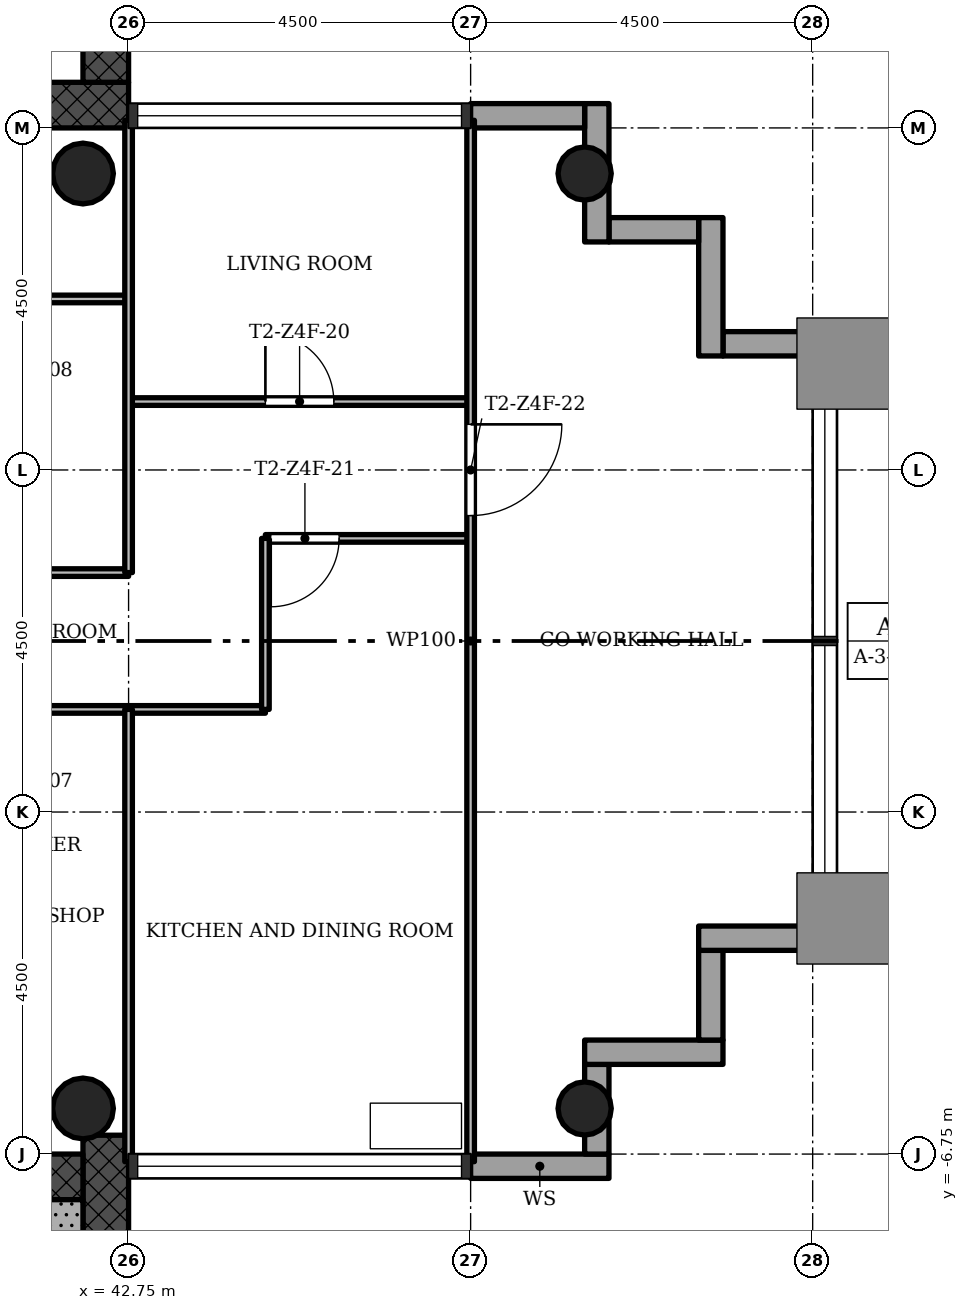
"""IFC4 building model, lengths in metres.
Left out: names, types, materials, properties, quantities, classifications, styles, units other than length and angle.
Written with IfcOpenShell. Run it as: python <this file> out.ifc"""

import sys

from ifc_helpers import new_model, si_unit, direction, frame, frame_2d, origin, origin_2d, place, context, subcontext, project, spatial, rectangle, hollow_circle, extrude, element, fill, save


model = new_model("IFC4")
c1 = context("Model", 3, precision=1e-05, world=origin(), true_north=direction((0.0, 1.0)))
c2 = subcontext(c1, "Body", "Model", "MODEL_VIEW")
j1 = project(units=[si_unit("LENGTHUNIT", "METRE"), si_unit("PLANEANGLEUNIT", "RADIAN")], contexts=[c1])
p1 = place(None, origin())
s1 = spatial("IfcSite", under=j1, at=p1, CompositionType="ELEMENT")
p2 = place(p1, origin())
s2 = spatial("IfcBuilding", under=s1, at=p2, CompositionType="ELEMENT")
p3 = place(p2, frame((0.0, 0.0, 216.4)))
s3 = spatial("IfcBuildingStorey", under=s2, at=p3, CompositionType="ELEMENT", Elevation=216.4)
p4 = place(p3, frame((29.85, 7.05, 0.0), z_axis=(0.0, 0.0, 1.0), x_axis=(1.0, 0.0, 0.0)))
e1 = element("IfcWall", 1, at=p4, inside=s3, PredefinedType="SHEAR", context=c2, shape_type="SweptSolid", body=[
    extrude(rectangle(XDim=12.9, YDim=0.6, at=frame_2d((6.45, 0.0))), origin(), (0.0, 0.0, 1.0), 3.4),
])
p5 = place(p4, frame((5.25, 0.0, 0.0)))
e2 = element("IfcOpeningElement", 2, at=p5, cuts=e1, PredefinedType="OPENING", context=c2, shape_type="SweptSolid", body=[
    extrude(rectangle(XDim=1.8, YDim=2.1, at=frame_2d((0.9, 1.05))), frame((0.0, 0.31, 0.0), z_axis=(0.0, -1.0, 0.0), x_axis=(1.0, 0.0, 0.0)), (0.0, 0.0, 1.0), 0.62),
])
p6 = place(p3, frame((42.45, 7.35, 0.0), z_axis=(0.0, 0.0, 1.0), x_axis=(0.0, 1.0, 0.0)))
e3 = element("IfcWall", 3, at=p6, inside=s3, PredefinedType="SHEAR", context=c2, shape_type="SweptSolid", body=[
    extrude(rectangle(XDim=8.4, YDim=0.6, at=frame_2d((4.2, 0.0))), origin(), (0.0, 0.0, 1.0), 3.4),
])
p7 = place(p3, frame((42.45, -15.15, 0.0), z_axis=(0.0, 0.0, 1.0), x_axis=(0.0, 1.0, 0.0)))
e4 = element("IfcWall", 4, at=p7, inside=s3, PredefinedType="SHEAR", context=c2, shape_type="SweptSolid", body=[
    extrude(rectangle(XDim=8.648, YDim=0.6, at=frame_2d((4.324, 0.0))), origin(), (0.0, 0.0, 1.0), 3.4),
])
p8 = place(p3, frame((42.15, -7.05, 0.0), z_axis=(0.0, 0.0, 1.0), x_axis=(-1.0, 0.0, 0.0)))
e5 = element("IfcWall", 5, at=p8, inside=s3, PredefinedType="SHEAR", context=c2, shape_type="SweptSolid", body=[
    extrude(rectangle(XDim=12.9, YDim=0.6, at=frame_2d((6.45, 0.0))), origin(), (0.0, 0.0, 1.0), 3.4),
])
p9 = place(p8, frame((5.25, 0.0, 0.0)))
e6 = element("IfcOpeningElement", 6, at=p9, cuts=e5, PredefinedType="OPENING", context=c2, shape_type="SweptSolid", body=[
    extrude(rectangle(XDim=1.8, YDim=2.1, at=frame_2d((0.9, 1.05))), frame((0.0, 0.31, 0.0), z_axis=(0.0, -1.0, 0.0), x_axis=(1.0, 0.0, 0.0)), (0.0, 0.0, 1.0), 0.62),
])
for number, where, z_axis, x_axis in (
    (7, (48.75, -6.15, 0.0), (0.0, 0.0, 1.0), (1.0, 0.0, 0.0)),
    (8, (48.75, 6.15, 0.0), (0.0, 0.0, 1.0), (1.0, 0.0, 0.0)),
):
    element("IfcColumn", number, at=place(p3, frame(where, z_axis=z_axis, x_axis=x_axis)), inside=s3, PredefinedType="COLUMN", context=c2, shape_type="SweptSolid", body=[
        extrude(hollow_circle(Radius=0.35, WallThickness=0.025, at=origin_2d()), origin(), (0.0, 0.0, 1.0), 3.4),
    ])
for number, where, z_axis, x_axis in (
    (9, (42.15, -6.15, 0.0), (0.0, 0.0, 1.0), (1.0, 0.0, 0.0)),
    (10, (42.15, 6.15, 0.0), (0.0, 0.0, 1.0), (1.0, 0.0, 0.0)),
):
    element("IfcColumn", number, at=place(p3, frame(where, z_axis=z_axis, x_axis=x_axis)), inside=s3, PredefinedType="COLUMN", context=c2, shape_type="SweptSolid", body=[
        extrude(hollow_circle(Radius=0.4, WallThickness=0.028, at=origin_2d()), origin(), (0.0, 0.0, 1.0), 3.4),
    ])
p10 = place(p3, frame((47.25, -6.91, -0.3), z_axis=(0.0, 0.0, 1.0), x_axis=(1.0, 0.0, 0.0)))
e11 = element("IfcWall", 11, at=p10, inside=s3, PredefinedType="STANDARD", context=c2, shape_type="SweptSolid", body=[
    extrude(rectangle(XDim=1.82, YDim=0.32, at=frame_2d((0.91, 0.0))), origin(), (0.0, 0.0, 1.0), 3.4),
])
p11 = place(p3, frame((48.91, -6.75, -0.3), z_axis=(0.0, 0.0, 1.0), x_axis=(0.0, 1.0, 0.0)))
e12 = element("IfcWall", 12, at=p11, inside=s3, PredefinedType="STANDARD", context=c2, shape_type="SweptSolid", body=[
    extrude(rectangle(XDim=1.18, YDim=0.32, at=frame_2d((0.59, 0.0))), origin(), (0.0, 0.0, 1.0), 3.4),
])
p12 = place(p3, frame((48.75, -5.41, -0.3), z_axis=(0.0, 0.0, 1.0), x_axis=(1.0, 0.0, 0.0)))
e13 = element("IfcWall", 13, at=p12, inside=s3, PredefinedType="STANDARD", context=c2, shape_type="SweptSolid", body=[
    extrude(rectangle(XDim=1.82, YDim=0.32, at=frame_2d((0.91, 0.0))), origin(), (0.0, 0.0, 1.0), 3.4),
])
p13 = place(p3, frame((50.41, -5.25, -0.3), z_axis=(0.0, 0.0, 1.0), x_axis=(0.0, 1.0, 0.0)))
e14 = element("IfcWall", 14, at=p13, inside=s3, PredefinedType="STANDARD", context=c2, shape_type="SweptSolid", body=[
    extrude(rectangle(XDim=1.18, YDim=0.32, at=frame_2d((0.59, 0.0))), origin(), (0.0, 0.0, 1.0), 3.4),
])
p14 = place(p3, frame((50.25, -3.91, -0.3), z_axis=(0.0, 0.0, 1.0), x_axis=(1.0, 0.0, 0.0)))
e15 = element("IfcWall", 15, at=p14, inside=s3, PredefinedType="STANDARD", context=c2, shape_type="SweptSolid", body=[
    extrude(rectangle(XDim=1.82, YDim=0.32, at=frame_2d((0.91, 0.0))), origin(), (0.0, 0.0, 1.0), 3.4),
])
p15 = place(p3, frame((52.07, 3.91, -0.3), z_axis=(0.0, 0.0, 1.0), x_axis=(-1.0, 0.0, 0.0)))
e16 = element("IfcWall", 16, at=p15, inside=s3, PredefinedType="STANDARD", context=c2, shape_type="SweptSolid", body=[
    extrude(rectangle(XDim=1.5, YDim=0.32, at=frame_2d((0.75, 0.0))), origin(), (0.0, 0.0, 1.0), 3.4),
])
p16 = place(p3, frame((50.41, 3.75, -0.3), z_axis=(0.0, 0.0, 1.0), x_axis=(0.0, 1.0, 0.0)))
e17 = element("IfcWall", 17, at=p16, inside=s3, PredefinedType="STANDARD", context=c2, shape_type="SweptSolid", body=[
    extrude(rectangle(XDim=1.82, YDim=0.32, at=frame_2d((0.91, 0.0))), origin(), (0.0, 0.0, 1.0), 3.4),
])
p17 = place(p3, frame((50.25, 5.41, -0.3), z_axis=(0.0, 0.0, 1.0), x_axis=(-1.0, 0.0, 0.0)))
e18 = element("IfcWall", 18, at=p17, inside=s3, PredefinedType="STANDARD", context=c2, shape_type="SweptSolid", body=[
    extrude(rectangle(XDim=1.18, YDim=0.32, at=frame_2d((0.59, 0.0))), origin(), (0.0, 0.0, 1.0), 3.4),
])
p18 = place(p3, frame((48.91, 5.25, -0.3), z_axis=(0.0, 0.0, 1.0), x_axis=(0.0, 1.0, 0.0)))
e19 = element("IfcWall", 19, at=p18, inside=s3, PredefinedType="STANDARD", context=c2, shape_type="SweptSolid", body=[
    extrude(rectangle(XDim=1.82, YDim=0.32, at=frame_2d((0.91, 0.0))), origin(), (0.0, 0.0, 1.0), 3.4),
])
p19 = place(p3, frame((48.75, 6.91, -0.3), z_axis=(0.0, 0.0, 1.0), x_axis=(-1.0, 0.0, 0.0)))
e20 = element("IfcWall", 20, at=p19, inside=s3, PredefinedType="STANDARD", context=c2, shape_type="SweptSolid", body=[
    extrude(rectangle(XDim=1.5, YDim=0.32, at=frame_2d((0.75, 0.0))), origin(), (0.0, 0.0, 1.0), 3.4),
])
p20 = place(p3, frame((44.55, -0.9, 0.0), z_axis=(0.0, 0.0, 1.0), x_axis=(-1.0, 0.0, 0.0)))
e21 = element("IfcWall", 21, at=p20, inside=s3, PredefinedType="PARTITIONING", context=c2, shape_type="SweptSolid", body=[
    extrude(rectangle(XDim=4.05, YDim=0.1, at=frame_2d((2.025, 0.0))), origin(), (0.0, 0.0, 1.0), 3.0),
])
p21 = place(p3, frame((42.75, 0.9, 0.0), z_axis=(0.0, 0.0, 1.0), x_axis=(-1.0, 0.0, 0.0)))
e22 = element("IfcWall", 22, at=p21, inside=s3, PredefinedType="PARTITIONING", context=c2, shape_type="SweptSolid", body=[
    extrude(rectangle(XDim=2.25, YDim=0.1, at=frame_2d((1.125, 0.0))), origin(), (0.0, 0.0, 1.0), 3.0),
])
p22 = place(p3, frame((47.25, 1.35, 0.0), z_axis=(0.0, 0.0, 1.0), x_axis=(-1.0, 0.0, 0.0)))
e23 = element("IfcWall", 23, at=p22, inside=s3, PredefinedType="PARTITIONING", context=c2, shape_type="SweptSolid", body=[
    extrude(rectangle(XDim=2.7, YDim=0.1, at=frame_2d((1.35, 0.0))), origin(), (0.0, 0.0, 1.0), 3.0),
])
p23 = place(p22, frame((1.73, 0.0, 0.0)))
e24 = element("IfcOpeningElement", 24, at=p23, cuts=e23, PredefinedType="OPENING", context=c2, shape_type="SweptSolid", body=[
    extrude(rectangle(XDim=0.9, YDim=2.1, at=frame_2d((0.45, 1.05))), frame((0.0, 0.06, 0.0), z_axis=(0.0, -1.0, 0.0), x_axis=(1.0, 0.0, 0.0)), (0.0, 0.0, 1.0), 0.12),
])
p24 = place(p3, frame((47.25, 3.15, 0.0), z_axis=(0.0, 0.0, 1.0), x_axis=(-1.0, 0.0, 0.0)))
e25 = element("IfcWall", 25, at=p24, inside=s3, PredefinedType="PARTITIONING", context=c2, shape_type="SweptSolid", body=[
    extrude(rectangle(XDim=4.5, YDim=0.1, at=frame_2d((2.25, 0.0))), origin(), (0.0, 0.0, 1.0), 3.0),
])
p25 = place(p24, frame((1.8, 0.0, 0.0)))
e26 = element("IfcOpeningElement", 26, at=p25, cuts=e25, PredefinedType="OPENING", context=c2, shape_type="SweptSolid", body=[
    extrude(rectangle(XDim=0.9, YDim=2.1, at=frame_2d((0.45, 1.05))), frame((0.0, 0.06, 0.0), z_axis=(0.0, -1.0, 0.0), x_axis=(1.0, 0.0, 0.0)), (0.0, 0.0, 1.0), 0.12),
])
p26 = place(p3, frame((42.75, 4.5, 0.0), z_axis=(0.0, 0.0, 1.0), x_axis=(-1.0, 0.0, 0.0)))
e27 = element("IfcWall", 27, at=p26, inside=s3, PredefinedType="PARTITIONING", context=c2, shape_type="SweptSolid", body=[
    extrude(rectangle(XDim=5.25, YDim=0.1, at=frame_2d((2.625, 0.0))), origin(), (0.0, 0.0, 1.0), 3.0),
])
p27 = place(p26, frame((3.3, 0.0, 0.0)))
e28 = element("IfcOpeningElement", 28, at=p27, cuts=e27, PredefinedType="OPENING", context=c2, shape_type="SweptSolid", body=[
    extrude(rectangle(XDim=0.9, YDim=2.1, at=frame_2d((0.45, 1.05))), frame((0.0, 0.06, 0.0), z_axis=(0.0, -1.0, 0.0), x_axis=(1.0, 0.0, 0.0)), (0.0, 0.0, 1.0), 0.12),
])
p28 = place(p3, frame((47.25, -6.85, 0.0), z_axis=(0.0, 0.0, 1.0), x_axis=(0.0, 1.0, 0.0)))
e29 = element("IfcWall", 29, at=p28, inside=s3, PredefinedType="PARTITIONING", context=c2, shape_type="SweptSolid", body=[
    extrude(rectangle(XDim=13.7, YDim=0.1, at=frame_2d((6.85, 0.0))), origin(), (0.0, 0.0, 1.0), 3.0),
])
p29 = place(p28, frame((8.5, 0.0, 0.0)))
e30 = element("IfcOpeningElement", 30, at=p29, cuts=e29, PredefinedType="OPENING", context=c2, shape_type="SweptSolid", body=[
    extrude(rectangle(XDim=1.2, YDim=2.1, at=frame_2d((0.6, 1.05))), frame((0.0, 0.06, 0.0), z_axis=(0.0, -1.0, 0.0), x_axis=(1.0, 0.0, 0.0)), (0.0, 0.0, 1.0), 0.12),
])
p30 = place(p3, frame((44.55, -0.9, 0.0), z_axis=(0.0, 0.0, 1.0), x_axis=(0.0, 1.0, 0.0)))
e31 = element("IfcWall", 31, at=p30, inside=s3, PredefinedType="PARTITIONING", context=c2, shape_type="SweptSolid", body=[
    extrude(rectangle(XDim=2.25, YDim=0.1, at=frame_2d((1.125, 0.0))), origin(), (0.0, 0.0, 1.0), 3.0),
])
for number, where, z_axis, x_axis in (
    (32, (42.75, -6.85, 0.0), (0.0, 0.0, 1.0), (0.0, 1.0, 0.0)),
    (33, (42.75, 0.9, 0.0), (0.0, 0.0, 1.0), (0.0, 1.0, 0.0)),
):
    element("IfcWall", number, at=place(p3, frame(where, z_axis=z_axis, x_axis=x_axis)), inside=s3, PredefinedType="PARTITIONING", context=c2, shape_type="SweptSolid", body=[
        extrude(rectangle(XDim=5.95, YDim=0.1, at=frame_2d((2.975, 0.0))), origin(), (0.0, 0.0, 1.0), 3.0),
    ])
p31 = place(p3, frame((37.85, -7.65, 0.0), z_axis=(0.0, 0.0, 1.0), x_axis=(1.0, 0.0, 0.0)))
e34 = element("IfcWall", 34, at=p31, inside=s3, PredefinedType="SHEAR", context=c2, shape_type="SweptSolid", body=[
    extrude(rectangle(XDim=4.3, YDim=0.6, at=frame_2d((2.15, 0.0))), origin(), (0.0, 0.0, 1.0), 3.4),
])
p32 = place(p25, origin())
e35 = element("IfcDoor", 35, at=p32, inside=s3, OperationType="SINGLE_SWING_RIGHT", PredefinedType="DOOR", context=c2, shape_type="SweptSolid", body=[
    extrude(rectangle(XDim=0.9, YDim=2.1, at=frame_2d((0.45, 1.05))), frame((0.0, 0.025, 0.0), z_axis=(0.0, -1.0, 0.0), x_axis=(1.0, 0.0, 0.0)), (0.0, 0.0, 1.0), 0.05),
])
fill(e26, e35)
p33 = place(p23, origin())
e36 = element("IfcDoor", 36, at=p33, inside=s3, OperationType="SINGLE_SWING_LEFT", PredefinedType="DOOR", context=c2, shape_type="SweptSolid", body=[
    extrude(rectangle(XDim=0.9, YDim=2.1, at=frame_2d((0.45, 1.05))), frame((0.0, 0.025, 0.0), z_axis=(0.0, -1.0, 0.0), x_axis=(1.0, 0.0, 0.0)), (0.0, 0.0, 1.0), 0.05),
])
fill(e24, e36)
p34 = place(p29, origin())
e37 = element("IfcDoor", 37, at=p34, inside=s3, OperationType="SINGLE_SWING_RIGHT", PredefinedType="DOOR", context=c2, shape_type="SweptSolid", body=[
    extrude(rectangle(XDim=1.2, YDim=2.1, at=frame_2d((0.6, 1.05))), frame((0.0, 0.025, 0.0), z_axis=(0.0, -1.0, 0.0), x_axis=(1.0, 0.0, 0.0)), (0.0, 0.0, 1.0), 0.05),
])
fill(e30, e37)
save(model, sys.argv[1])
